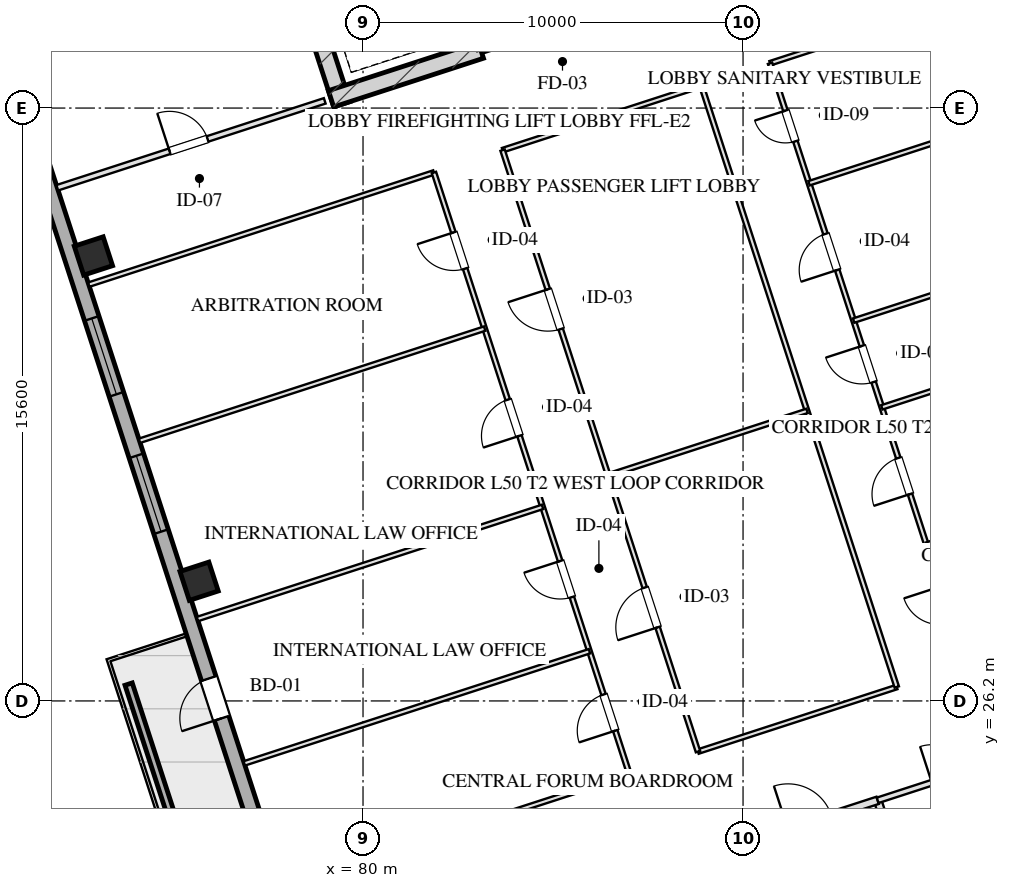
"""IFC4 building model, lengths in metres.
Left out: names, types, materials, properties, quantities, classifications, styles, units other than length and angle.
Written with IfcOpenShell. Run it as: python <this file> out.ifc"""

import sys

from ifc_helpers import new_model, si_unit, direction, frame, frame_2d, origin, origin_2d, place, context, subcontext, project, spatial, rectangle, hollow_rectangle, extrude, element, fill, save


model = new_model("IFC4")
c1 = context("Model", 3, precision=1e-05, world=origin(), true_north=direction((0.0, 1.0)))
c2 = subcontext(c1, "Body", "Model", "MODEL_VIEW")
j1 = project(units=[si_unit("LENGTHUNIT", "METRE"), si_unit("PLANEANGLEUNIT", "RADIAN")], contexts=[c1])
p1 = place(None, origin())
s1 = spatial("IfcSite", under=j1, at=p1, CompositionType="ELEMENT")
p2 = place(p1, origin())
s2 = spatial("IfcBuilding", under=s1, at=p2, CompositionType="ELEMENT")
p3 = place(p2, frame((0.0, 0.0, 188.6)))
s3 = spatial("IfcBuildingStorey", under=s2, at=p3, CompositionType="ELEMENT", Elevation=188.6)
p4 = place(p3, frame((79.442, 41.899, 0.0), z_axis=(0.0, 0.0, 1.0), x_axis=(-0.309035778627, 0.951050412717, 0.0)))
e1 = element("IfcWall", 1, at=p4, inside=s3, PredefinedType="SHEAR", context=c2, shape_type="SweptSolid", body=[
    extrude(rectangle(XDim=9.33, YDim=0.45, at=frame_2d((4.665, 0.0))), origin(), (0.0, 0.0, 1.0), 3.45),
])
p5 = place(p3, frame((79.159, 42.043, 0.0), z_axis=(0.0, 0.0, 1.0), x_axis=(0.951047485828, 0.309044785913, 0.0)))
e2 = element("IfcWall", 2, at=p5, inside=s3, PredefinedType="SHEAR", context=c2, shape_type="SweptSolid", body=[
    extrude(rectangle(XDim=4.145, YDim=0.45, at=frame_2d((2.073, 0.0))), origin(), (0.0, 0.0, 1.0), 3.45),
])
for number, where, z_axis, x_axis in (
    (3, (75.687, 29.349, 0.0), (0.0, 0.0, 1.0), (0.951, 0.309, 0.0)),
    (4, (72.906, 37.909, 0.0), (0.0, 0.0, 1.0), (0.951, 0.309, 0.0)),
):
    element("IfcColumn", number, at=place(p3, frame(where, z_axis=z_axis, x_axis=x_axis)), inside=s3, PredefinedType="COLUMN", context=c2, shape_type="SweptSolid", body=[
        extrude(hollow_rectangle(XDim=0.8, YDim=0.8, WallThickness=0.028, at=origin_2d()), origin(), (0.0, 0.0, 1.0), 3.451),
    ])
p6 = place(p3, frame((81.776, 8.827, 0.0), z_axis=(0.0, 0.0, 1.0), x_axis=(-0.309014228706, 0.951057414911, 0.0)))
e5 = element("IfcWall", 5, at=p6, inside=s3, PredefinedType="SOLIDWALL", context=c2, shape_type="SweptSolid", body=[
    extrude(rectangle(XDim=42.8, YDim=0.4, at=frame_2d((21.4, 0.0))), origin(), (0.0, 0.0, 1.0), 2.61),
])
p7 = place(p6, frame((22.95, 0.0, 0.75)))
e6 = element("IfcOpeningElement", 6, at=p7, cuts=e5, PredefinedType="OPENING", context=c2, shape_type="SweptSolid", body=[
    extrude(rectangle(XDim=2.1, YDim=1.46, at=frame_2d((1.05, 0.73))), frame((0.0, 0.21, 0.0), z_axis=(0.0, -1.0, 0.0), x_axis=(1.0, 0.0, 0.0)), (0.0, 0.0, 1.0), 0.42),
])
p8 = place(p6, frame((26.75, 0.0, 0.75)))
e7 = element("IfcOpeningElement", 7, at=p8, cuts=e5, PredefinedType="OPENING", context=c2, shape_type="SweptSolid", body=[
    extrude(rectangle(XDim=2.1, YDim=1.46, at=frame_2d((1.05, 0.73))), frame((0.0, 0.21, 0.0), z_axis=(0.0, -1.0, 0.0), x_axis=(1.0, 0.0, 0.0)), (0.0, 0.0, 1.0), 0.42),
])
p9 = place(p6, frame((17.787, 0.0, 0.0)))
e8 = element("IfcOpeningElement", 8, at=p9, cuts=e5, PredefinedType="OPENING", context=c2, shape_type="SweptSolid", body=[
    extrude(rectangle(XDim=1.1, YDim=2.15, at=frame_2d((0.55, 1.075))), frame((0.0, 0.21, 0.0), z_axis=(0.0, -1.0, 0.0), x_axis=(1.0, 0.0, 0.0)), (0.0, 0.0, 1.0), 0.42),
])
p10 = place(p3, frame((75.315, 22.079, 0.0), z_axis=(0.0, 0.0, 1.0), x_axis=(-0.309032019345, 0.951051634255, 0.0)))
e9 = element("IfcWall", 9, at=p10, inside=s3, PredefinedType="PARAPET", context=c2, shape_type="SweptSolid", body=[
    extrude(rectangle(XDim=4.8, YDim=0.2, at=frame_2d((2.4, 0.0))), origin(), (0.0, 0.0, 1.0), 0.75),
])
p11 = place(p3, frame((93.542, 23.585, 0.0), z_axis=(0.0, 0.0, 1.0), x_axis=(0.309042196757, -0.951048327176, 0.0)))
e10 = element("IfcWall", 10, at=p11, inside=s3, PredefinedType="PARTITIONING", context=c2, shape_type="SweptSolid", body=[
    extrude(rectangle(XDim=8.43, YDim=0.2, at=frame_2d((4.215, 0.0))), origin(), (0.0, 0.0, 1.0), 3.175),
])
p12 = place(p3, frame((89.899, 22.401, 0.0), z_axis=(0.0, 0.0, 1.0), x_axis=(0.951046716504, 0.309047153403, 0.0)))
e11 = element("IfcWall", 11, at=p12, inside=s3, PredefinedType="PARTITIONING", context=c2, shape_type="SweptSolid", body=[
    extrude(rectangle(XDim=3.83, YDim=0.2, at=frame_2d((1.915, 0.0))), origin(), (0.0, 0.0, 1.0), 3.175),
])
p13 = place(p12, frame((1.35, 0.0, 0.0)))
e12 = element("IfcOpeningElement", 12, at=p13, cuts=e11, PredefinedType="OPENING", context=c2, shape_type="SweptSolid", body=[
    extrude(rectangle(XDim=1.2, YDim=2.05, at=frame_2d((0.6, 1.025))), frame((0.0, 0.11, 0.0), z_axis=(0.0, -1.0, 0.0), x_axis=(1.0, 0.0, 0.0)), (0.0, 0.0, 1.0), 0.22),
])
p14 = place(p3, frame((93.542, 23.585, 0.0), z_axis=(0.0, 0.0, 1.0), x_axis=(0.951063829732, 0.308994485023, 0.0)))
e13 = element("IfcWall", 13, at=p14, inside=s3, PredefinedType="PARTITIONING", context=c2, shape_type="SweptSolid", body=[
    extrude(rectangle(XDim=4.4, YDim=0.15, at=frame_2d((2.2, 0.0))), origin(), (0.0, 0.0, 1.0), 3.175),
])
p15 = place(p14, frame((1.5, 0.0, 0.0)))
e14 = element("IfcOpeningElement", 14, at=p15, cuts=e13, PredefinedType="OPENING", context=c2, shape_type="SweptSolid", body=[
    extrude(rectangle(XDim=1.0, YDim=2.05, at=frame_2d((0.5, 1.025))), frame((0.0, 0.085, 0.0), z_axis=(0.0, -1.0, 0.0), x_axis=(1.0, 0.0, 0.0)), (0.0, 0.0, 1.0), 0.17),
])
p16 = place(p3, frame((83.101, 43.324, 0.0), z_axis=(0.0, 0.0, 1.0), x_axis=(0.951052804469, 0.309028417967, 0.0)))
e15 = element("IfcWall", 15, at=p16, inside=s3, PredefinedType="PARTITIONING", context=c2, shape_type="SweptSolid", body=[
    extrude(rectangle(XDim=3.83, YDim=0.2, at=frame_2d((1.915, 0.0))), origin(), (0.0, 0.0, 1.0), 3.175),
])
p17 = place(p16, frame((1.35, 0.0, 0.0)))
e16 = element("IfcOpeningElement", 16, at=p17, cuts=e15, PredefinedType="OPENING", context=c2, shape_type="SweptSolid", body=[
    extrude(rectangle(XDim=1.2, YDim=2.05, at=frame_2d((0.6, 1.025))), frame((0.0, 0.11, 0.0), z_axis=(0.0, -1.0, 0.0), x_axis=(1.0, 0.0, 0.0)), (0.0, 0.0, 1.0), 0.22),
])
p18 = place(p3, frame((71.955, 39.703, 0.0), z_axis=(0.0, 0.0, 1.0), x_axis=(0.951060977215, 0.309003264738, 0.0)))
e17 = element("IfcWall", 17, at=p18, inside=s3, PredefinedType="PARTITIONING", context=c2, shape_type="SweptSolid", body=[
    extrude(rectangle(XDim=7.4, YDim=0.15, at=frame_2d((3.7, 0.0))), origin(), (0.0, 0.0, 1.0), 3.175),
])
p19 = place(p18, frame((3.108, 0.0, 0.0)))
e18 = element("IfcOpeningElement", 18, at=p19, cuts=e17, PredefinedType="OPENING", context=c2, shape_type="SweptSolid", body=[
    extrude(rectangle(XDim=1.05, YDim=2.05, at=frame_2d((0.525, 1.025))), frame((0.0, 0.085, 0.0), z_axis=(0.0, -1.0, 0.0), x_axis=(1.0, 0.0, 0.0)), (0.0, 0.0, 1.0), 0.17),
])
p20 = place(p3, frame((77.925, 21.328, 0.0), z_axis=(0.0, 0.0, 1.0), x_axis=(0.951053980838, 0.309024797601, 0.0)))
e19 = element("IfcWall", 19, at=p20, inside=s3, PredefinedType="PARTITIONING", context=c2, shape_type="SweptSolid", body=[
    extrude(rectangle(XDim=9.55, YDim=0.12, at=frame_2d((4.775, 0.0))), origin(), (0.0, 0.0, 1.0), 3.175),
])
p21 = place(p3, frame((88.814, 24.867, 0.0), z_axis=(0.0, 0.0, 1.0), x_axis=(0.951061793147, 0.309000753423, 0.0)))
e20 = element("IfcWall", 20, at=p21, inside=s3, PredefinedType="PARTITIONING", context=c2, shape_type="SweptSolid", body=[
    extrude(rectangle(XDim=5.5, YDim=0.12, at=frame_2d((2.75, 0.0))), origin(), (0.0, 0.0, 1.0), 3.175),
])
p22 = place(p3, frame((72.783, 37.154, 0.0), z_axis=(0.0, 0.0, 1.0), x_axis=(0.951053980838, 0.309024797601, 0.0)))
e21 = element("IfcWall", 21, at=p22, inside=s3, PredefinedType="PARTITIONING", context=c2, shape_type="SweptSolid", body=[
    extrude(rectangle(XDim=9.55, YDim=0.12, at=frame_2d((4.775, 0.0))), origin(), (0.0, 0.0, 1.0), 3.175),
])
p23 = place(p3, frame((83.672, 40.692, 0.0), z_axis=(0.0, 0.0, 1.0), x_axis=(0.951048747115, 0.30904090443, 0.0)))
e22 = element("IfcWall", 22, at=p23, inside=s3, PredefinedType="PARTITIONING", context=c2, shape_type="SweptSolid", body=[
    extrude(rectangle(XDim=5.5, YDim=0.12, at=frame_2d((2.75, 0.0))), origin(), (0.0, 0.0, 1.0), 3.175),
])
p24 = place(p3, frame((90.71, 42.979, 0.0), z_axis=(0.0, 0.0, 1.0), x_axis=(0.95105853842, 0.309010770845, 0.0)))
e23 = element("IfcWall", 23, at=p24, inside=s3, PredefinedType="PARTITIONING", context=c2, shape_type="SweptSolid", body=[
    extrude(rectangle(XDim=11.95, YDim=0.12, at=frame_2d((5.975, 0.0))), origin(), (0.0, 0.0, 1.0), 3.175),
])
p25 = place(p3, frame((87.007, 24.28, 0.0), z_axis=(0.0, 0.0, 1.0), x_axis=(-0.309022042254, 0.951054876125, 0.0)))
e24 = element("IfcWall", 24, at=p25, inside=s3, PredefinedType="PARTITIONING", context=c2, shape_type="SweptSolid", body=[
    extrude(rectangle(XDim=16.64, YDim=0.12, at=frame_2d((8.32, 0.0))), origin(), (0.0, 0.0, 1.0), 3.175),
])
p26 = place(p25, frame((1.197, 0.0, 0.0)))
e25 = element("IfcOpeningElement", 25, at=p26, cuts=e24, PredefinedType="OPENING", context=c2, shape_type="SweptSolid", body=[
    extrude(rectangle(XDim=1.0, YDim=2.05, at=frame_2d((0.5, 1.025))), frame((0.0, 0.07, 0.0), z_axis=(0.0, -1.0, 0.0), x_axis=(1.0, 0.0, 0.0)), (0.0, 0.0, 1.0), 0.14),
])
p27 = place(p25, frame((4.891, 0.0, 0.0)))
e26 = element("IfcOpeningElement", 26, at=p27, cuts=e24, PredefinedType="OPENING", context=c2, shape_type="SweptSolid", body=[
    extrude(rectangle(XDim=1.0, YDim=2.05, at=frame_2d((0.5, 1.025))), frame((0.0, 0.07, 0.0), z_axis=(0.0, -1.0, 0.0), x_axis=(1.0, 0.0, 0.0)), (0.0, 0.0, 1.0), 0.14),
])
p28 = place(p25, frame((9.354, 0.0, 0.0)))
e27 = element("IfcOpeningElement", 27, at=p28, cuts=e24, PredefinedType="OPENING", context=c2, shape_type="SweptSolid", body=[
    extrude(rectangle(XDim=1.0, YDim=2.05, at=frame_2d((0.5, 1.025))), frame((0.0, 0.07, 0.0), z_axis=(0.0, -1.0, 0.0), x_axis=(1.0, 0.0, 0.0)), (0.0, 0.0, 1.0), 0.14),
])
p29 = place(p25, frame((13.98, 0.0, 0.0)))
e28 = element("IfcOpeningElement", 28, at=p29, cuts=e24, PredefinedType="OPENING", context=c2, shape_type="SweptSolid", body=[
    extrude(rectangle(XDim=1.0, YDim=2.05, at=frame_2d((0.5, 1.025))), frame((0.0, 0.07, 0.0), z_axis=(0.0, -1.0, 0.0), x_axis=(1.0, 0.0, 0.0)), (0.0, 0.0, 1.0), 0.14),
])
p30 = place(p3, frame((88.814, 24.867, 0.0), z_axis=(0.0, 0.0, 1.0), x_axis=(-0.309022042254, 0.951054876125, 0.0)))
e29 = element("IfcWall", 29, at=p30, inside=s3, PredefinedType="PARTITIONING", context=c2, shape_type="SweptSolid", body=[
    extrude(rectangle(XDim=16.64, YDim=0.12, at=frame_2d((8.32, 0.0))), origin(), (0.0, 0.0, 1.0), 3.175),
])
p31 = place(p30, frame((3.438, 0.0, 0.0)))
e30 = element("IfcOpeningElement", 30, at=p31, cuts=e29, PredefinedType="OPENING", context=c2, shape_type="SweptSolid", body=[
    extrude(rectangle(XDim=1.1, YDim=2.05, at=frame_2d((0.55, 1.025))), frame((0.0, 0.07, 0.0), z_axis=(0.0, -1.0, 0.0), x_axis=(1.0, 0.0, 0.0)), (0.0, 0.0, 1.0), 0.14),
])
p32 = place(p30, frame((11.69, 0.0, 0.0)))
e31 = element("IfcOpeningElement", 31, at=p32, cuts=e29, PredefinedType="OPENING", context=c2, shape_type="SweptSolid", body=[
    extrude(rectangle(XDim=1.1, YDim=2.05, at=frame_2d((0.55, 1.025))), frame((0.0, 0.07, 0.0), z_axis=(0.0, -1.0, 0.0), x_axis=(1.0, 0.0, 0.0)), (0.0, 0.0, 1.0), 0.14),
])
p33 = place(p3, frame((94.045, 26.566, 0.0), z_axis=(0.0, 0.0, 1.0), x_axis=(-0.30901773025, 0.951056277195, 0.0)))
e32 = element("IfcWall", 32, at=p33, inside=s3, PredefinedType="PARTITIONING", context=c2, shape_type="SweptSolid", body=[
    extrude(rectangle(XDim=16.64, YDim=0.12, at=frame_2d((8.32, 0.0))), origin(), (0.0, 0.0, 1.0), 3.175),
])
p34 = place(p3, frame((95.852, 27.153, 0.0), z_axis=(0.0, 0.0, 1.0), x_axis=(-0.309004459387, 0.951060589068, 0.0)))
e33 = element("IfcWall", 33, at=p34, inside=s3, PredefinedType="PARTITIONING", context=c2, shape_type="SweptSolid", body=[
    extrude(rectangle(XDim=16.64, YDim=0.12, at=frame_2d((8.32, 0.0))), origin(), (0.0, 0.0, 1.0), 3.175),
])
p35 = place(p34, frame((1.16, 0.0, 0.0)))
e34 = element("IfcOpeningElement", 34, at=p35, cuts=e33, PredefinedType="OPENING", context=c2, shape_type="SweptSolid", body=[
    extrude(rectangle(XDim=1.0, YDim=2.05, at=frame_2d((0.5, 1.025))), frame((0.0, 0.07, 0.0), z_axis=(0.0, -1.0, 0.0), x_axis=(1.0, 0.0, 0.0)), (0.0, 0.0, 1.0), 0.14),
])
p36 = place(p34, frame((4.72, 0.0, 0.0)))
e35 = element("IfcOpeningElement", 35, at=p36, cuts=e33, PredefinedType="OPENING", context=c2, shape_type="SweptSolid", body=[
    extrude(rectangle(XDim=1.0, YDim=2.05, at=frame_2d((0.5, 1.025))), frame((0.0, 0.07, 0.0), z_axis=(0.0, -1.0, 0.0), x_axis=(1.0, 0.0, 0.0)), (0.0, 0.0, 1.0), 0.14),
])
p37 = place(p34, frame((7.82, 0.0, 0.0)))
e36 = element("IfcOpeningElement", 36, at=p37, cuts=e33, PredefinedType="OPENING", context=c2, shape_type="SweptSolid", body=[
    extrude(rectangle(XDim=1.0, YDim=2.05, at=frame_2d((0.5, 1.025))), frame((0.0, 0.07, 0.0), z_axis=(0.0, -1.0, 0.0), x_axis=(1.0, 0.0, 0.0)), (0.0, 0.0, 1.0), 0.14),
])
p38 = place(p34, frame((10.92, 0.0, 0.0)))
e37 = element("IfcOpeningElement", 37, at=p38, cuts=e33, PredefinedType="OPENING", context=c2, shape_type="SweptSolid", body=[
    extrude(rectangle(XDim=1.0, YDim=2.05, at=frame_2d((0.5, 1.025))), frame((0.0, 0.07, 0.0), z_axis=(0.0, -1.0, 0.0), x_axis=(1.0, 0.0, 0.0)), (0.0, 0.0, 1.0), 0.14),
])
p39 = place(p34, frame((14.48, 0.0, 0.0)))
e38 = element("IfcOpeningElement", 38, at=p39, cuts=e33, PredefinedType="OPENING", context=c2, shape_type="SweptSolid", body=[
    extrude(rectangle(XDim=0.85, YDim=2.05, at=frame_2d((0.425, 1.025))), frame((0.0, 0.07, 0.0), z_axis=(0.0, -1.0, 0.0), x_axis=(1.0, 0.0, 0.0)), (0.0, 0.0, 1.0), 0.14),
])
p40 = place(p3, frame((86.453, 32.133, 0.0), z_axis=(0.0, 0.0, 1.0), x_axis=(0.951052986339, 0.309027858251, 0.0)))
e39 = element("IfcWall", 39, at=p40, inside=s3, PredefinedType="PARTITIONING", context=c2, shape_type="SweptSolid", body=[
    extrude(rectangle(XDim=5.5, YDim=0.12, at=frame_2d((2.75, 0.0))), origin(), (0.0, 0.0, 1.0), 3.175),
])
p41 = place(p3, frame((76.876, 24.557, 0.0), z_axis=(0.0, 0.0, 1.0), x_axis=(0.951056422073, 0.309017284359, 0.0)))
e40 = element("IfcWall", 40, at=p41, inside=s3, PredefinedType="PARTITIONING", context=c2, shape_type="SweptSolid", body=[
    extrude(rectangle(XDim=9.55, YDim=0.12, at=frame_2d((4.775, 0.0))), origin(), (0.0, 0.0, 1.0), 3.175),
])
for number, where, z_axis, x_axis in (
    (41, (75.642, 28.355, 0.0), (0.0, 0.0, 1.0), (0.951, 0.309, 0.0)),
    (42, (74.118, 33.045, 0.0), (0.0, 0.0, 1.0), (0.951, 0.309, 0.0)),
):
    element("IfcWall", number, at=place(p3, frame(where, z_axis=z_axis, x_axis=x_axis)), inside=s3, PredefinedType="PARTITIONING", context=c2, shape_type="SweptSolid", body=[
        extrude(rectangle(XDim=9.55, YDim=0.12, at=frame_2d((4.775, 0.0))), origin(), (0.0, 0.0, 1.0), 3.175),
    ])
for number, where, z_axis, x_axis in (
    (43, (94.826, 30.311, 0.0), (0.0, 0.0, 1.0), (0.951, 0.309, 0.0)),
    (44, (93.652, 33.925, 0.0), (0.0, 0.0, 1.0), (0.951, 0.309, 0.0)),
):
    element("IfcWall", number, at=place(p3, frame(where, z_axis=z_axis, x_axis=x_axis)), inside=s3, PredefinedType="PARTITIONING", context=c2, shape_type="SweptSolid", body=[
        extrude(rectangle(XDim=11.95, YDim=0.12, at=frame_2d((5.975, 0.0))), origin(), (0.0, 0.0, 1.0), 3.175),
    ])
for number, where, z_axis, x_axis in (
    (45, (92.91, 36.207, 0.0), (0.0, 0.0, 1.0), (0.951, 0.309, 0.0)),
    (46, (91.736, 39.821, 0.0), (0.0, 0.0, 1.0), (0.951, 0.309, 0.0)),
):
    element("IfcWall", number, at=place(p3, frame(where, z_axis=z_axis, x_axis=x_axis)), inside=s3, PredefinedType="PARTITIONING", context=c2, shape_type="SweptSolid", body=[
        extrude(rectangle(XDim=11.95, YDim=0.12, at=frame_2d((5.975, 0.0))), origin(), (0.0, 0.0, 1.0), 3.175),
    ])
p42 = place(p7, origin())
e47 = element("IfcWindow", 47, at=p42, inside=s3, PartitioningType="TRIPLE_PANEL_VERTICAL", PredefinedType="WINDOW", context=c2, shape_type="SweptSolid", body=[
    extrude(rectangle(XDim=2.1, YDim=1.46, at=frame_2d((1.05, 0.73))), frame((0.0, 0.03, 0.0), z_axis=(0.0, -1.0, 0.0), x_axis=(1.0, 0.0, 0.0)), (0.0, 0.0, 1.0), 0.06),
])
fill(e6, e47)
p43 = place(p8, origin())
e48 = element("IfcWindow", 48, at=p43, inside=s3, PartitioningType="TRIPLE_PANEL_VERTICAL", PredefinedType="WINDOW", context=c2, shape_type="SweptSolid", body=[
    extrude(rectangle(XDim=2.1, YDim=1.46, at=frame_2d((1.05, 0.73))), frame((0.0, 0.03, 0.0), z_axis=(0.0, -1.0, 0.0), x_axis=(1.0, 0.0, 0.0)), (0.0, 0.0, 1.0), 0.06),
])
fill(e7, e48)
p44 = place(p9, origin())
e49 = element("IfcDoor", 49, at=p44, inside=s3, OperationType="SINGLE_SWING_LEFT", PredefinedType="DOOR", context=c2, shape_type="SweptSolid", body=[
    extrude(rectangle(XDim=1.1, YDim=2.15, at=frame_2d((0.55, 1.075))), frame((0.0, 0.025, 0.0), z_axis=(0.0, -1.0, 0.0), x_axis=(1.0, 0.0, 0.0)), (0.0, 0.0, 1.0), 0.05),
])
fill(e8, e49)
p45 = place(p19, origin())
e50 = element("IfcDoor", 50, at=p45, inside=s3, OperationType="SINGLE_SWING_LEFT", PredefinedType="DOOR", context=c2, shape_type="SweptSolid", body=[
    extrude(rectangle(XDim=1.05, YDim=2.05, at=frame_2d((0.525, 1.025))), frame((0.0, 0.025, 0.0), z_axis=(0.0, -1.0, 0.0), x_axis=(1.0, 0.0, 0.0)), (0.0, 0.0, 1.0), 0.05),
])
fill(e18, e50)
p46 = place(p26, origin())
e51 = element("IfcDoor", 51, at=p46, inside=s3, OperationType="SINGLE_SWING_LEFT", PredefinedType="DOOR", context=c2, shape_type="SweptSolid", body=[
    extrude(rectangle(XDim=1.0, YDim=2.05, at=frame_2d((0.5, 1.025))), frame((0.0, 0.025, 0.0), z_axis=(0.0, -1.0, 0.0), x_axis=(1.0, 0.0, 0.0)), (0.0, 0.0, 1.0), 0.05),
])
fill(e25, e51)
p47 = place(p27, origin())
e52 = element("IfcDoor", 52, at=p47, inside=s3, OperationType="SINGLE_SWING_RIGHT", PredefinedType="DOOR", context=c2, shape_type="SweptSolid", body=[
    extrude(rectangle(XDim=1.0, YDim=2.05, at=frame_2d((0.5, 1.025))), frame((0.0, 0.025, 0.0), z_axis=(0.0, -1.0, 0.0), x_axis=(1.0, 0.0, 0.0)), (0.0, 0.0, 1.0), 0.05),
])
fill(e26, e52)
p48 = place(p28, origin())
e53 = element("IfcDoor", 53, at=p48, inside=s3, OperationType="SINGLE_SWING_LEFT", PredefinedType="DOOR", context=c2, shape_type="SweptSolid", body=[
    extrude(rectangle(XDim=1.0, YDim=2.05, at=frame_2d((0.5, 1.025))), frame((0.0, 0.025, 0.0), z_axis=(0.0, -1.0, 0.0), x_axis=(1.0, 0.0, 0.0)), (0.0, 0.0, 1.0), 0.05),
])
fill(e27, e53)
p49 = place(p29, origin())
e54 = element("IfcDoor", 54, at=p49, inside=s3, OperationType="SINGLE_SWING_RIGHT", PredefinedType="DOOR", context=c2, shape_type="SweptSolid", body=[
    extrude(rectangle(XDim=1.0, YDim=2.05, at=frame_2d((0.5, 1.025))), frame((0.0, 0.025, 0.0), z_axis=(0.0, -1.0, 0.0), x_axis=(1.0, 0.0, 0.0)), (0.0, 0.0, 1.0), 0.05),
])
fill(e28, e54)
p50 = place(p31, origin())
e55 = element("IfcDoor", 55, at=p50, inside=s3, OperationType="SINGLE_SWING_LEFT", PredefinedType="DOOR", context=c2, shape_type="SweptSolid", body=[
    extrude(rectangle(XDim=1.1, YDim=2.05, at=frame_2d((0.55, 1.025))), frame((0.0, 0.025, 0.0), z_axis=(0.0, -1.0, 0.0), x_axis=(1.0, 0.0, 0.0)), (0.0, 0.0, 1.0), 0.05),
])
fill(e30, e55)
p51 = place(p32, origin())
e56 = element("IfcDoor", 56, at=p51, inside=s3, OperationType="SINGLE_SWING_RIGHT", PredefinedType="DOOR", context=c2, shape_type="SweptSolid", body=[
    extrude(rectangle(XDim=1.1, YDim=2.05, at=frame_2d((0.55, 1.025))), frame((0.0, 0.025, 0.0), z_axis=(0.0, -1.0, 0.0), x_axis=(1.0, 0.0, 0.0)), (0.0, 0.0, 1.0), 0.05),
])
fill(e31, e56)
p52 = place(p36, origin())
e57 = element("IfcDoor", 57, at=p52, inside=s3, OperationType="SINGLE_SWING_LEFT", PredefinedType="DOOR", context=c2, shape_type="SweptSolid", body=[
    extrude(rectangle(XDim=1.0, YDim=2.05, at=frame_2d((0.5, 1.025))), frame((0.0, 0.025, 0.0), z_axis=(0.0, -1.0, 0.0), x_axis=(1.0, 0.0, 0.0)), (0.0, 0.0, 1.0), 0.05),
])
fill(e35, e57)
p53 = place(p37, origin())
e58 = element("IfcDoor", 58, at=p53, inside=s3, OperationType="SINGLE_SWING_RIGHT", PredefinedType="DOOR", context=c2, shape_type="SweptSolid", body=[
    extrude(rectangle(XDim=1.0, YDim=2.05, at=frame_2d((0.5, 1.025))), frame((0.0, 0.025, 0.0), z_axis=(0.0, -1.0, 0.0), x_axis=(1.0, 0.0, 0.0)), (0.0, 0.0, 1.0), 0.05),
])
fill(e36, e58)
p54 = place(p38, origin())
e59 = element("IfcDoor", 59, at=p54, inside=s3, OperationType="SINGLE_SWING_LEFT", PredefinedType="DOOR", context=c2, shape_type="SweptSolid", body=[
    extrude(rectangle(XDim=1.0, YDim=2.05, at=frame_2d((0.5, 1.025))), frame((0.0, 0.025, 0.0), z_axis=(0.0, -1.0, 0.0), x_axis=(1.0, 0.0, 0.0)), (0.0, 0.0, 1.0), 0.05),
])
fill(e37, e59)
p55 = place(p39, origin())
e60 = element("IfcDoor", 60, at=p55, inside=s3, OperationType="SINGLE_SWING_RIGHT", PredefinedType="DOOR", context=c2, shape_type="SweptSolid", body=[
    extrude(rectangle(XDim=0.85, YDim=2.05, at=frame_2d((0.425, 1.025))), frame((0.0, 0.025, 0.0), z_axis=(0.0, -1.0, 0.0), x_axis=(1.0, 0.0, 0.0)), (0.0, 0.0, 1.0), 0.05),
])
fill(e38, e60)
save(model, sys.argv[1])
